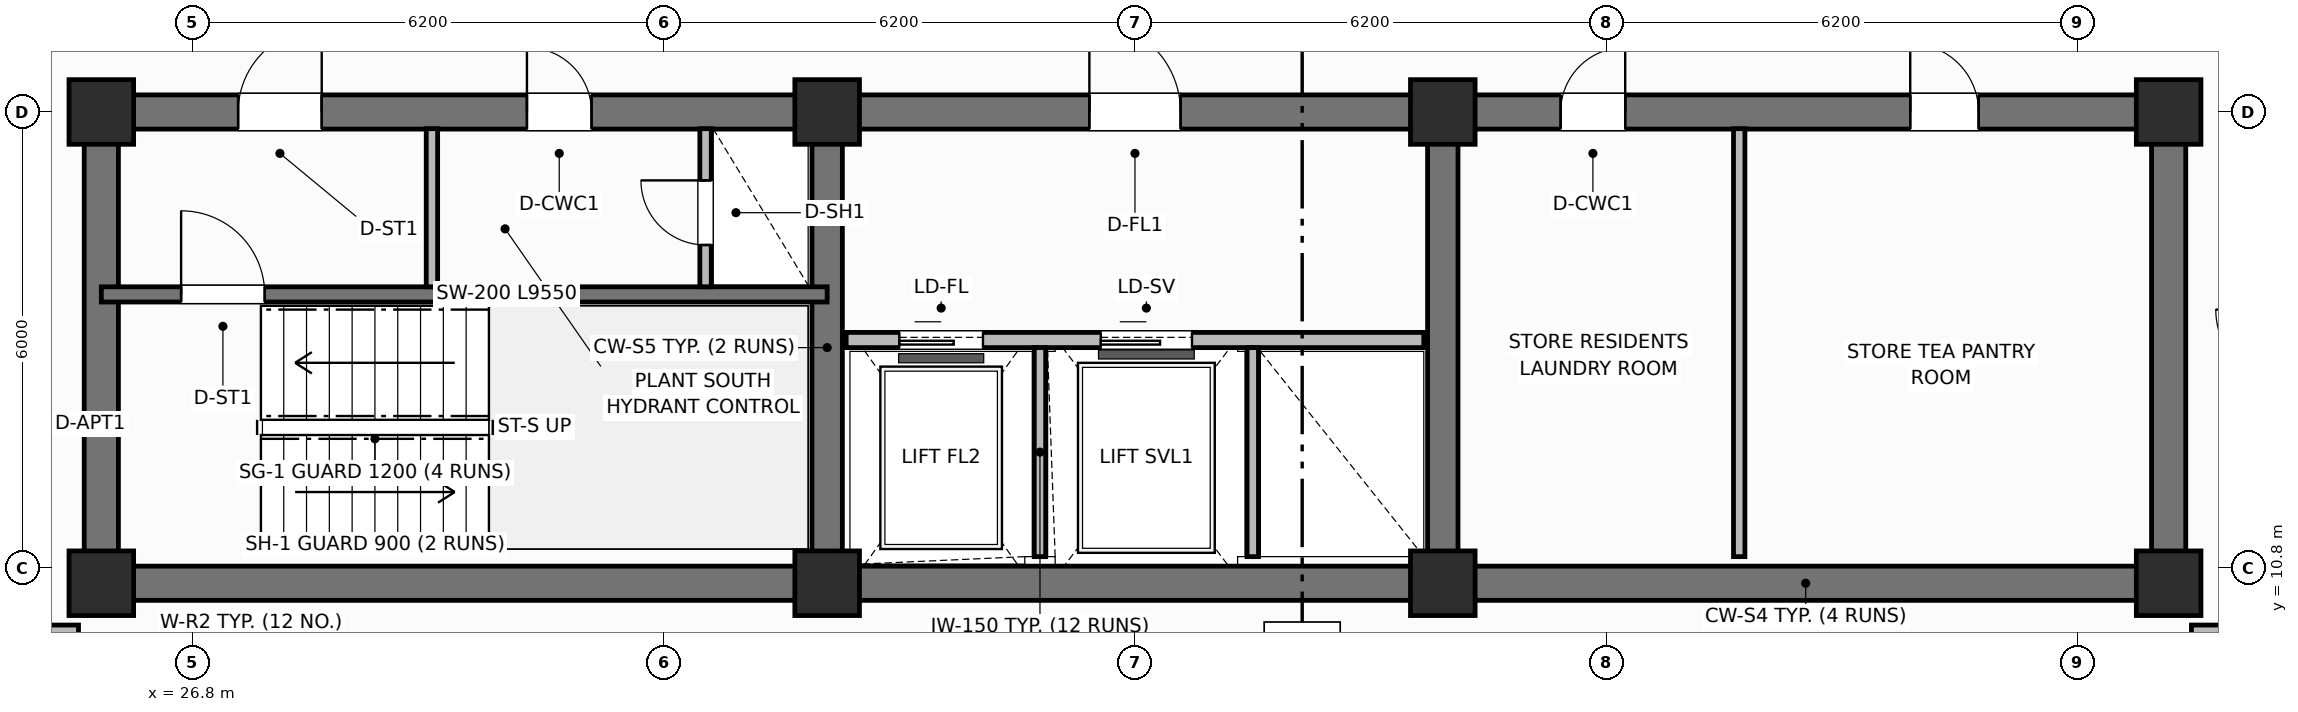
"""IFC4 building model, lengths in metres.
Left out: names, types, materials, properties, quantities, classifications, styles, units other than length and angle.
Written with IfcOpenShell. Run it as: python <this file> out.ifc"""

import sys

from ifc_helpers import new_model, si_unit, direction, frame, frame_2d, origin, origin_2d, place, context, subcontext, project, spatial, rectangle, extrude, element, fill, save


model = new_model("IFC4")
c1 = context("Model", 3, precision=1e-05, world=origin(), true_north=direction((0.0, 1.0)))
c2 = subcontext(c1, "Body", "Model", "MODEL_VIEW")
j1 = project(units=[si_unit("LENGTHUNIT", "METRE"), si_unit("PLANEANGLEUNIT", "RADIAN")], contexts=[c1])
p1 = place(None, origin())
s1 = spatial("IfcSite", under=j1, at=p1, CompositionType="ELEMENT")
p2 = place(p1, origin())
s2 = spatial("IfcBuilding", under=s1, at=p2, CompositionType="ELEMENT")
p3 = place(p2, frame((0.0, 0.0, 248.0)))
s3 = spatial("IfcBuildingStorey", under=s2, at=p3, CompositionType="ELEMENT", Elevation=248.0)
p4 = place(p3, frame((52.8, 10.6, 0.0), z_axis=(0.0, 0.0, 1.0), x_axis=(-1.0, 0.0, 0.0)))
e1 = element("IfcWall", 1, at=p4, inside=s3, PredefinedType="SHEAR", context=c2, shape_type="SweptSolid", body=[
    extrude(rectangle(XDim=27.2, YDim=0.45, at=frame_2d((13.6, 0.0))), origin(), (0.0, 0.0, 1.0), 3.7),
])
for number, where, z_axis, x_axis in (
    (2, (25.6, 10.825, 0.0), (0.0, 0.0, 1.0), (0.0, 1.0, 0.0)),
    (3, (52.8, 10.825, 0.0), (0.0, 0.0, 1.0), (0.0, 1.0, 0.0)),
):
    element("IfcWall", number, at=place(p3, frame(where, z_axis=z_axis, x_axis=x_axis)), inside=s3, PredefinedType="SHEAR", context=c2, shape_type="SweptSolid", body=[
        extrude(rectangle(XDim=5.75, YDim=0.45, at=frame_2d((2.875, 0.0))), origin(), (0.0, 0.0, 1.0), 3.7),
    ])
p5 = place(p3, frame((25.6, 16.8, 0.0), z_axis=(0.0, 0.0, 1.0), x_axis=(1.0, 0.0, 0.0)))
e4 = element("IfcWall", 4, at=p5, inside=s3, PredefinedType="SHEAR", context=c2, shape_type="SweptSolid", body=[
    extrude(rectangle(XDim=27.2, YDim=0.45, at=frame_2d((13.6, 0.0))), origin(), (0.0, 0.0, 1.0), 3.7),
])
p6 = place(p5, frame((1.8, 0.0, 0.0)))
e5 = element("IfcOpeningElement", 5, at=p6, cuts=e4, PredefinedType="OPENING", context=c2, shape_type="SweptSolid", body=[
    extrude(rectangle(XDim=1.1, YDim=2.15, at=frame_2d((0.55, 1.075))), frame((0.0, 0.235, 0.0), z_axis=(0.0, -1.0, 0.0), x_axis=(1.0, 0.0, 0.0)), (0.0, 0.0, 1.0), 0.47),
])
p7 = place(p5, frame((5.6, 0.0, 0.0)))
e6 = element("IfcOpeningElement", 6, at=p7, cuts=e4, PredefinedType="OPENING", context=c2, shape_type="SweptSolid", body=[
    extrude(rectangle(XDim=0.85, YDim=2.1, at=frame_2d((0.425, 1.05))), frame((0.0, 0.235, 0.0), z_axis=(0.0, -1.0, 0.0), x_axis=(1.0, 0.0, 0.0)), (0.0, 0.0, 1.0), 0.47),
])
p8 = place(p5, frame((13.0, 0.0, 0.0)))
e7 = element("IfcOpeningElement", 7, at=p8, cuts=e4, PredefinedType="OPENING", context=c2, shape_type="SweptSolid", body=[
    extrude(rectangle(XDim=1.2, YDim=2.15, at=frame_2d((0.6, 1.075))), frame((0.0, 0.235, 0.0), z_axis=(0.0, -1.0, 0.0), x_axis=(1.0, 0.0, 0.0)), (0.0, 0.0, 1.0), 0.47),
])
p9 = place(p5, frame((19.2, 0.0, 0.0)))
e8 = element("IfcOpeningElement", 8, at=p9, cuts=e4, PredefinedType="OPENING", context=c2, shape_type="SweptSolid", body=[
    extrude(rectangle(XDim=0.85, YDim=2.1, at=frame_2d((0.425, 1.05))), frame((0.0, 0.235, 0.0), z_axis=(0.0, -1.0, 0.0), x_axis=(1.0, 0.0, 0.0)), (0.0, 0.0, 1.0), 0.47),
])
p10 = place(p5, frame((23.8, 0.0, 0.0)))
e9 = element("IfcOpeningElement", 9, at=p10, cuts=e4, PredefinedType="OPENING", context=c2, shape_type="SweptSolid", body=[
    extrude(rectangle(XDim=0.9, YDim=2.1, at=frame_2d((0.45, 1.05))), frame((0.0, 0.235, 0.0), z_axis=(0.0, -1.0, 0.0), x_axis=(1.0, 0.0, 0.0)), (0.0, 0.0, 1.0), 0.47),
])
for number, where, z_axis, x_axis in (
    (10, (35.15, 10.825, 0.0), (0.0, 0.0, 1.0), (0.0, 1.0, 0.0)),
    (11, (43.25, 10.825, 0.0), (0.0, 0.0, 1.0), (0.0, 1.0, 0.0)),
):
    element("IfcWall", number, at=place(p3, frame(where, z_axis=z_axis, x_axis=x_axis)), inside=s3, PredefinedType="SHEAR", context=c2, shape_type="SweptSolid", body=[
        extrude(rectangle(XDim=5.75, YDim=0.4, at=frame_2d((2.875, 0.0))), origin(), (0.0, 0.0, 1.0), 3.7),
    ])
for number, where, z_axis, x_axis in (
    (12, (25.6, 10.6, 0.0), (0.0, 0.0, 1.0), (1.0, 0.0, 0.0)),
    (13, (25.6, 16.8, 0.0), (0.0, 0.0, 1.0), (1.0, 0.0, 0.0)),
    (14, (35.15, 10.6, 0.0), (0.0, 0.0, 1.0), (1.0, 0.0, 0.0)),
    (15, (35.15, 16.8, 0.0), (0.0, 0.0, 1.0), (1.0, 0.0, 0.0)),
    (16, (43.25, 10.6, 0.0), (0.0, 0.0, 1.0), (1.0, 0.0, 0.0)),
    (17, (43.25, 16.8, 0.0), (0.0, 0.0, 1.0), (1.0, 0.0, 0.0)),
    (18, (52.8, 10.6, 0.0), (0.0, 0.0, 1.0), (1.0, 0.0, 0.0)),
    (19, (52.8, 16.8, 0.0), (0.0, 0.0, 1.0), (1.0, 0.0, 0.0)),
):
    element("IfcColumn", number, at=place(p3, frame(where, z_axis=z_axis, x_axis=x_axis)), inside=s3, PredefinedType="COLUMN", context=c2, shape_type="SweptSolid", body=[
        extrude(rectangle(XDim=0.85, YDim=0.85, at=origin_2d()), origin(), (0.0, 0.0, 1.0), 3.7),
    ])
p11 = place(p3, frame((25.6, 14.4, 0.0), z_axis=(0.0, 0.0, 1.0), x_axis=(1.0, 0.0, 0.0)))
e20 = element("IfcWall", 20, at=p11, inside=s3, PredefinedType="SHEAR", context=c2, shape_type="SweptSolid", body=[
    extrude(rectangle(XDim=9.55, YDim=0.2, at=frame_2d((4.775, 0.0))), origin(), (0.0, 0.0, 1.0), 3.7),
])
p12 = place(p11, frame((1.05, 0.0, 0.0)))
e21 = element("IfcOpeningElement", 21, at=p12, cuts=e20, PredefinedType="OPENING", context=c2, shape_type="SweptSolid", body=[
    extrude(rectangle(XDim=1.1, YDim=2.15, at=frame_2d((0.55, 1.075))), frame((0.0, 0.11, 0.0), z_axis=(0.0, -1.0, 0.0), x_axis=(1.0, 0.0, 0.0)), (0.0, 0.0, 1.0), 0.22),
])
p13 = place(p3, frame((29.95, 14.5, 0.0), z_axis=(0.0, 0.0, 1.0), x_axis=(0.0, 1.0, 0.0)))
e22 = element("IfcWall", 22, at=p13, inside=s3, PredefinedType="PARTITIONING", context=c2, shape_type="SweptSolid", body=[
    extrude(rectangle(XDim=2.08, YDim=0.15, at=frame_2d((1.04, 0.0))), origin(), (0.0, 0.0, 1.0), 2.56),
])
p14 = place(p3, frame((33.55, 14.5, 0.0), z_axis=(0.0, 0.0, 1.0), x_axis=(0.0, 1.0, 0.0)))
e23 = element("IfcWall", 23, at=p14, inside=s3, PredefinedType="PARTITIONING", context=c2, shape_type="SweptSolid", body=[
    extrude(rectangle(XDim=2.08, YDim=0.15, at=frame_2d((1.04, 0.0))), origin(), (0.0, 0.0, 1.0), 2.56),
])
p15 = place(p14, frame((0.55, 0.0, 0.0)))
e24 = element("IfcOpeningElement", 24, at=p15, cuts=e23, PredefinedType="OPENING", context=c2, shape_type="SweptSolid", body=[
    extrude(rectangle(XDim=0.85, YDim=2.05, at=frame_2d((0.425, 1.025))), frame((0.0, 0.085, 0.0), z_axis=(0.0, -1.0, 0.0), x_axis=(1.0, 0.0, 0.0)), (0.0, 0.0, 1.0), 0.17),
])
p16 = place(p3, frame((35.4, 13.8, 0.0), z_axis=(0.0, 0.0, 1.0), x_axis=(1.0, 0.0, 0.0)))
e25 = element("IfcWall", 25, at=p16, inside=s3, PredefinedType="PARTITIONING", context=c2, shape_type="SweptSolid", body=[
    extrude(rectangle(XDim=7.6, YDim=0.2, at=frame_2d((3.8, 0.0))), origin(), (0.0, 0.0, 1.0), 2.33),
])
p17 = place(p16, frame((0.7, 0.0, 0.0)))
e26 = element("IfcOpeningElement", 26, at=p17, cuts=e25, PredefinedType="OPENING", context=c2, shape_type="SweptSolid", body=[
    extrude(rectangle(XDim=1.1, YDim=2.15, at=frame_2d((0.55, 1.075))), frame((0.0, 0.11, 0.0), z_axis=(0.0, -1.0, 0.0), x_axis=(1.0, 0.0, 0.0)), (0.0, 0.0, 1.0), 0.22),
])
p18 = place(p16, frame((3.35, 0.0, 0.0)))
e27 = element("IfcOpeningElement", 27, at=p18, cuts=e25, PredefinedType="OPENING", context=c2, shape_type="SweptSolid", body=[
    extrude(rectangle(XDim=1.2, YDim=2.15, at=frame_2d((0.6, 1.075))), frame((0.0, 0.11, 0.0), z_axis=(0.0, -1.0, 0.0), x_axis=(1.0, 0.0, 0.0)), (0.0, 0.0, 1.0), 0.22),
])
for number, where, z_axis, x_axis in (
    (28, (37.95, 10.95, 0.0), (0.0, 0.0, 1.0), (0.0, 1.0, 0.0)),
    (29, (40.75, 10.95, 0.0), (0.0, 0.0, 1.0), (0.0, 1.0, 0.0)),
):
    element("IfcWall", number, at=place(p3, frame(where, z_axis=z_axis, x_axis=x_axis)), inside=s3, PredefinedType="PARTITIONING", context=c2, shape_type="SweptSolid", body=[
        extrude(rectangle(XDim=2.75, YDim=0.15, at=frame_2d((1.375, 0.0))), origin(), (0.0, 0.0, 1.0), 2.56),
    ])
p19 = place(p3, frame((47.15, 10.95, 0.0), z_axis=(0.0, 0.0, 1.0), x_axis=(0.0, 1.0, 0.0)))
e30 = element("IfcWall", 30, at=p19, inside=s3, PredefinedType="PARTITIONING", context=c2, shape_type="SweptSolid", body=[
    extrude(rectangle(XDim=5.63, YDim=0.15, at=frame_2d((2.815, 0.0))), origin(), (0.0, 0.0, 1.0), 2.56),
])
p20 = place(p3, frame((21.546, 9.95, 0.0), z_axis=(0.0, 0.0, 1.0), x_axis=(1.0, 0.0, 0.0)))
e31 = element("IfcWall", 31, at=p20, inside=s3, PredefinedType="PARTITIONING", context=c2, shape_type="SweptSolid", body=[
    extrude(rectangle(XDim=3.754, YDim=0.2, at=frame_2d((1.877, 0.0))), origin(), (0.0, 0.0, 1.0), 2.56),
])
p21 = place(p3, frame((53.1, 9.95, 0.0), z_axis=(0.0, 0.0, 1.0), x_axis=(1.0, 0.0, 0.0)))
e32 = element("IfcWall", 32, at=p21, inside=s3, PredefinedType="PARTITIONING", context=c2, shape_type="SweptSolid", body=[
    extrude(rectangle(XDim=3.754, YDim=0.2, at=frame_2d((1.877, 0.0))), origin(), (0.0, 0.0, 1.0), 2.56),
])
p22 = place(p12, origin())
e33 = element("IfcDoor", 33, at=p22, inside=s3, OperationType="SINGLE_SWING_LEFT", PredefinedType="DOOR", context=c2, shape_type="SweptSolid", body=[
    extrude(rectangle(XDim=1.1, YDim=2.15, at=frame_2d((0.55, 1.075))), frame((0.0, 0.025, 0.0), z_axis=(0.0, -1.0, 0.0), x_axis=(1.0, 0.0, 0.0)), (0.0, 0.0, 1.0), 0.05),
])
fill(e21, e33)
p23 = place(p15, origin())
e34 = element("IfcDoor", 34, at=p23, inside=s3, OperationType="SINGLE_SWING_RIGHT", PredefinedType="TRAPDOOR", context=c2, shape_type="SweptSolid", body=[
    extrude(rectangle(XDim=0.85, YDim=2.05, at=frame_2d((0.425, 1.025))), frame((0.0, 0.025, 0.0), z_axis=(0.0, -1.0, 0.0), x_axis=(1.0, 0.0, 0.0)), (0.0, 0.0, 1.0), 0.05),
])
fill(e24, e34)
p24 = place(p17, origin())
e35 = element("IfcDoor", 35, at=p24, inside=s3, OperationType="SLIDING_TO_LEFT", PredefinedType="DOOR", context=c2, shape_type="SweptSolid", body=[
    extrude(rectangle(XDim=1.1, YDim=2.15, at=frame_2d((0.55, 1.075))), frame((0.0, 0.025, 0.0), z_axis=(0.0, -1.0, 0.0), x_axis=(1.0, 0.0, 0.0)), (0.0, 0.0, 1.0), 0.05),
])
fill(e26, e35)
p25 = place(p18, origin())
e36 = element("IfcDoor", 36, at=p25, inside=s3, OperationType="SLIDING_TO_LEFT", PredefinedType="DOOR", context=c2, shape_type="SweptSolid", body=[
    extrude(rectangle(XDim=1.2, YDim=2.15, at=frame_2d((0.6, 1.075))), frame((0.0, 0.025, 0.0), z_axis=(0.0, -1.0, 0.0), x_axis=(1.0, 0.0, 0.0)), (0.0, 0.0, 1.0), 0.05),
])
fill(e27, e36)
p26 = place(p6, origin())
e37 = element("IfcDoor", 37, at=p26, inside=s3, OperationType="SINGLE_SWING_RIGHT", PredefinedType="DOOR", context=c2, shape_type="SweptSolid", body=[
    extrude(rectangle(XDim=1.1, YDim=2.15, at=frame_2d((0.55, 1.075))), frame((0.0, 0.025, 0.0), z_axis=(0.0, -1.0, 0.0), x_axis=(1.0, 0.0, 0.0)), (0.0, 0.0, 1.0), 0.05),
])
fill(e5, e37)
p27 = place(p7, origin())
e38 = element("IfcDoor", 38, at=p27, inside=s3, OperationType="SINGLE_SWING_LEFT", PredefinedType="DOOR", context=c2, shape_type="SweptSolid", body=[
    extrude(rectangle(XDim=0.85, YDim=2.1, at=frame_2d((0.425, 1.05))), frame((0.0, 0.025, 0.0), z_axis=(0.0, -1.0, 0.0), x_axis=(1.0, 0.0, 0.0)), (0.0, 0.0, 1.0), 0.05),
])
fill(e6, e38)
p28 = place(p8, origin())
e39 = element("IfcDoor", 39, at=p28, inside=s3, OperationType="SINGLE_SWING_LEFT", PredefinedType="DOOR", context=c2, shape_type="SweptSolid", body=[
    extrude(rectangle(XDim=1.2, YDim=2.15, at=frame_2d((0.6, 1.075))), frame((0.0, 0.025, 0.0), z_axis=(0.0, -1.0, 0.0), x_axis=(1.0, 0.0, 0.0)), (0.0, 0.0, 1.0), 0.05),
])
fill(e7, e39)
p29 = place(p9, origin())
e40 = element("IfcDoor", 40, at=p29, inside=s3, OperationType="SINGLE_SWING_RIGHT", PredefinedType="DOOR", context=c2, shape_type="SweptSolid", body=[
    extrude(rectangle(XDim=0.85, YDim=2.1, at=frame_2d((0.425, 1.05))), frame((0.0, 0.025, 0.0), z_axis=(0.0, -1.0, 0.0), x_axis=(1.0, 0.0, 0.0)), (0.0, 0.0, 1.0), 0.05),
])
fill(e8, e40)
p30 = place(p10, origin())
e41 = element("IfcDoor", 41, at=p30, inside=s3, OperationType="SINGLE_SWING_LEFT", PredefinedType="DOOR", context=c2, shape_type="SweptSolid", body=[
    extrude(rectangle(XDim=0.9, YDim=2.1, at=frame_2d((0.45, 1.05))), frame((0.0, 0.025, 0.0), z_axis=(0.0, -1.0, 0.0), x_axis=(1.0, 0.0, 0.0)), (0.0, 0.0, 1.0), 0.05),
])
fill(e9, e41)
save(model, sys.argv[1])
